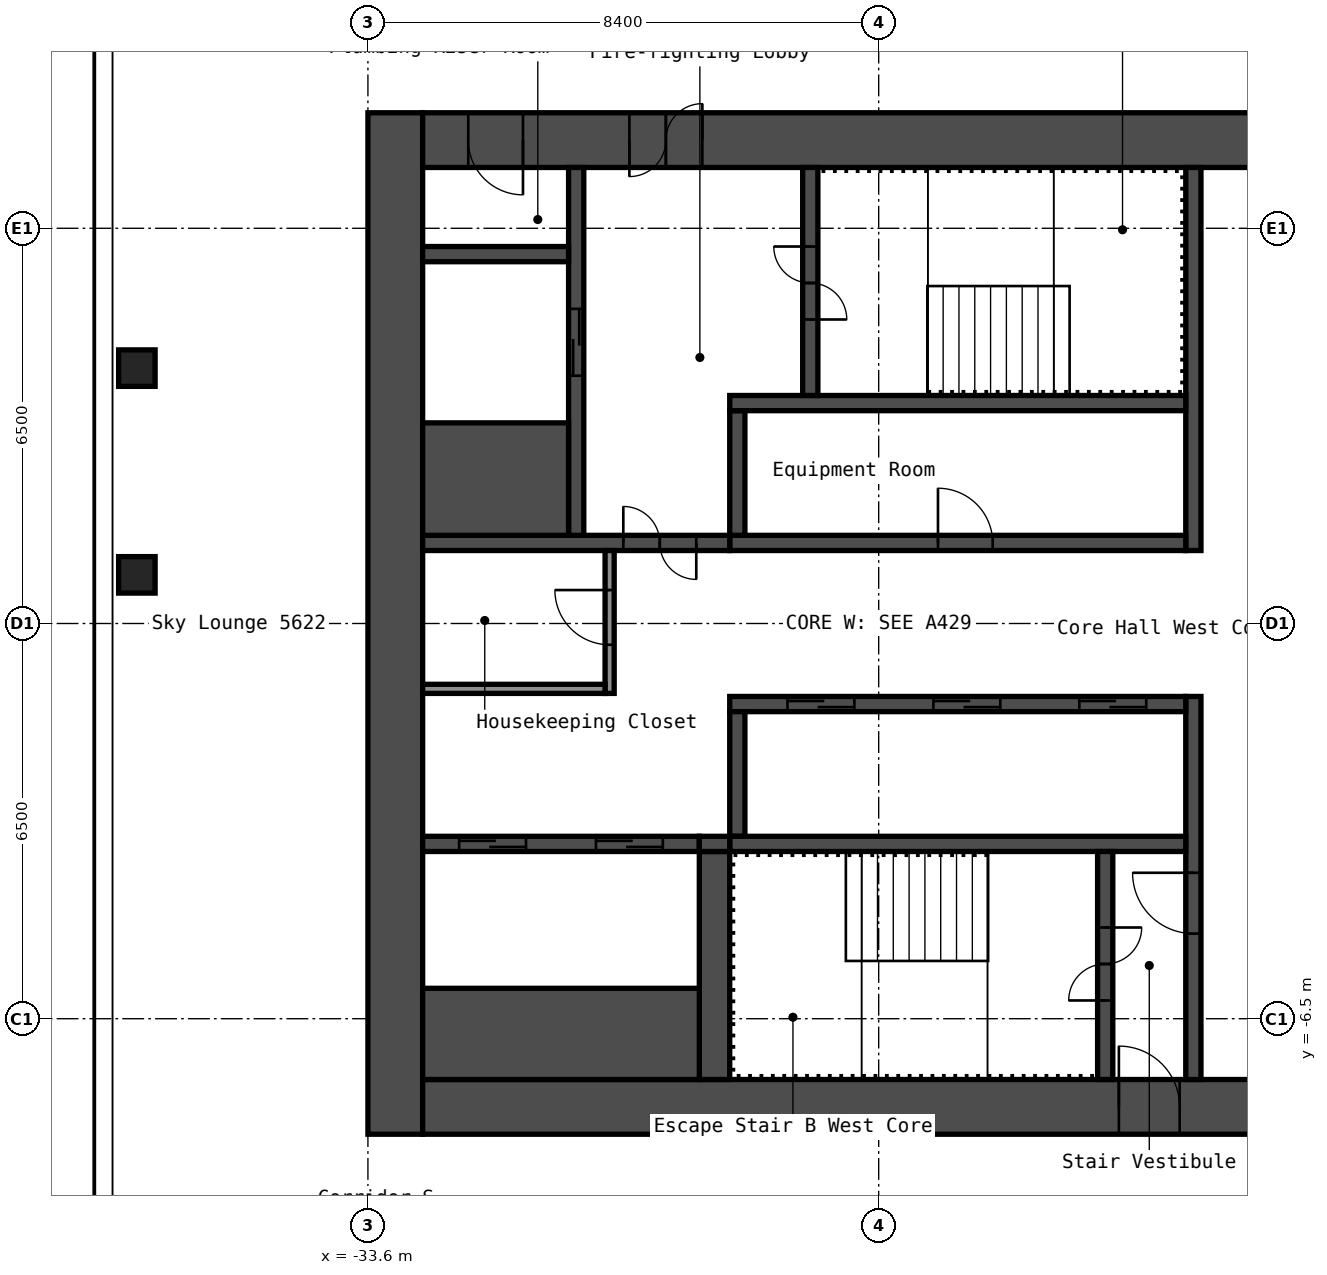
"""IFC4 building model, lengths in metres.
Left out: names, types, materials, properties, quantities, classifications, styles, units other than length and angle.
Written with IfcOpenShell. Run it as: python <this file> out.ifc"""

import sys

from ifc_helpers import new_model, si_unit, direction, frame, frame_2d, origin, origin_2d, place, context, subcontext, project, spatial, rectangle, hollow_rectangle, extrude, element, fill, save


model = new_model("IFC4")
c1 = context("Model", 3, precision=1e-05, world=origin(), true_north=direction((0.0, 1.0)))
c2 = subcontext(c1, "Body", "Model", "MODEL_VIEW")
j1 = project(units=[si_unit("LENGTHUNIT", "METRE"), si_unit("PLANEANGLEUNIT", "RADIAN")], contexts=[c1])
p1 = place(None, origin())
s1 = spatial("IfcSite", under=j1, at=p1, CompositionType="ELEMENT")
p2 = place(p1, origin())
s2 = spatial("IfcBuilding", under=s1, at=p2, CompositionType="ELEMENT")
p3 = place(p2, frame((0.0, 0.0, 199.4)))
s3 = spatial("IfcBuildingStorey", under=s2, at=p3, CompositionType="ELEMENT", Elevation=199.4)
for number, where, z_axis, x_axis in (
    (1, (-37.4, 0.8, 0.0), (0.0, 0.0, 1.0), (1.0, 0.0, 0.0)),
    (2, (-37.4, 4.2, 0.0), (0.0, 0.0, 1.0), (1.0, 0.0, 0.0)),
):
    element("IfcColumn", number, at=place(p3, frame(where, z_axis=z_axis, x_axis=x_axis)), inside=s3, PredefinedType="COLUMN", context=c2, shape_type="SweptSolid", body=[
        extrude(hollow_rectangle(XDim=0.6, YDim=0.6, WallThickness=0.025, InnerFilletRadius=0.038, OuterFilletRadius=0.062, at=origin_2d()), origin(), (0.0, 0.0, 1.0), 2.75),
    ])
p4 = place(p3, frame((-33.15, -8.4, 0.0), z_axis=(0.0, 0.0, 1.0), x_axis=(0.0, 1.0, 0.0)))
e3 = element("IfcWall", 3, at=p4, inside=s3, PredefinedType="SHEAR", context=c2, shape_type="SweptSolid", body=[
    extrude(rectangle(XDim=16.8, YDim=0.9, at=frame_2d((8.4, 0.0))), origin(), (0.0, 0.0, 1.0), 2.75),
])
p5 = place(p3, frame((-32.7, 7.95, 0.0), z_axis=(0.0, 0.0, 1.0), x_axis=(1.0, 0.0, 0.0)))
e4 = element("IfcWall", 4, at=p5, inside=s3, PredefinedType="SHEAR", context=c2, shape_type="SweptSolid", body=[
    extrude(rectangle(XDim=15.0, YDim=0.9, at=frame_2d((7.5, 0.0))), origin(), (0.0, 0.0, 1.0), 2.75),
])
p6 = place(p5, frame((3.4, 0.0, 0.0)))
e5 = element("IfcOpeningElement", 5, at=p6, cuts=e4, PredefinedType="OPENING", context=c2, shape_type="SweptSolid", body=[
    extrude(rectangle(XDim=1.2, YDim=2.1, at=frame_2d((0.6, 1.05))), frame((0.0, 0.46, 0.0), z_axis=(0.0, -1.0, 0.0), x_axis=(1.0, 0.0, 0.0)), (0.0, 0.0, 1.0), 0.92),
])
p7 = place(p5, frame((0.75, 0.0, 0.0)))
e6 = element("IfcOpeningElement", 6, at=p7, cuts=e4, PredefinedType="OPENING", context=c2, shape_type="SweptSolid", body=[
    extrude(rectangle(XDim=0.9, YDim=2.1, at=frame_2d((0.45, 1.05))), frame((0.0, 0.46, 0.0), z_axis=(0.0, -1.0, 0.0), x_axis=(1.0, 0.0, 0.0)), (0.0, 0.0, 1.0), 0.92),
])
p8 = place(p3, frame((-32.7, -7.95, 0.0), z_axis=(0.0, 0.0, 1.0), x_axis=(1.0, 0.0, 0.0)))
e7 = element("IfcWall", 7, at=p8, inside=s3, PredefinedType="SHEAR", context=c2, shape_type="SweptSolid", body=[
    extrude(rectangle(XDim=15.0, YDim=0.9, at=frame_2d((7.5, 0.0))), origin(), (0.0, 0.0, 1.0), 2.75),
])
p9 = place(p8, frame((11.45, 0.0, 0.0)))
e8 = element("IfcOpeningElement", 8, at=p9, cuts=e7, PredefinedType="OPENING", context=c2, shape_type="SweptSolid", body=[
    extrude(rectangle(XDim=1.0, YDim=2.1, at=frame_2d((0.5, 1.05))), frame((0.0, 0.46, 0.0), z_axis=(0.0, -1.0, 0.0), x_axis=(1.0, 0.0, 0.0)), (0.0, 0.0, 1.0), 0.92),
])
p10 = place(p3, frame((-20.025, 1.2, 0.0), z_axis=(0.0, 0.0, 1.0), x_axis=(0.0, 1.0, 0.0)))
e9 = element("IfcWall", 9, at=p10, inside=s3, PredefinedType="SHEAR", context=c2, shape_type="SweptSolid", body=[
    extrude(rectangle(XDim=6.3, YDim=0.25, at=frame_2d((3.15, 0.0))), origin(), (0.0, 0.0, 1.0), 2.75),
])
p11 = place(p3, frame((-20.025, -7.5, 0.0), z_axis=(0.0, 0.0, 1.0), x_axis=(0.0, 1.0, 0.0)))
e10 = element("IfcWall", 10, at=p11, inside=s3, PredefinedType="SHEAR", context=c2, shape_type="SweptSolid", body=[
    extrude(rectangle(XDim=6.3, YDim=0.25, at=frame_2d((3.15, 0.0))), origin(), (0.0, 0.0, 1.0), 2.75),
])
p12 = place(p11, frame((2.4, 0.0, 0.0)))
e11 = element("IfcOpeningElement", 11, at=p12, cuts=e10, PredefinedType="OPENING", context=c2, shape_type="SweptSolid", body=[
    extrude(rectangle(XDim=1.0, YDim=2.1, at=frame_2d((0.5, 1.05))), frame((0.0, 0.135, 0.0), z_axis=(0.0, -1.0, 0.0), x_axis=(1.0, 0.0, 0.0)), (0.0, 0.0, 1.0), 0.27),
])
p13 = place(p3, frame((-27.65, 1.325, 0.0), z_axis=(0.0, 0.0, 1.0), x_axis=(1.0, 0.0, 0.0)))
e12 = element("IfcWall", 12, at=p13, inside=s3, PredefinedType="SHEAR", context=c2, shape_type="SweptSolid", body=[
    extrude(rectangle(XDim=7.5, YDim=0.25, at=frame_2d((3.75, 0.0))), origin(), (0.0, 0.0, 1.0), 2.75),
])
p14 = place(p13, frame((3.425, 0.0, 0.0)))
e13 = element("IfcOpeningElement", 13, at=p14, cuts=e12, PredefinedType="OPENING", context=c2, shape_type="SweptSolid", body=[
    extrude(rectangle(XDim=0.9, YDim=2.1, at=frame_2d((0.45, 1.05))), frame((0.0, 0.135, 0.0), z_axis=(0.0, -1.0, 0.0), x_axis=(1.0, 0.0, 0.0)), (0.0, 0.0, 1.0), 0.27),
])
p15 = place(p3, frame((-27.525, 1.45, 0.0), z_axis=(0.0, 0.0, 1.0), x_axis=(0.0, 1.0, 0.0)))
e14 = element("IfcWall", 14, at=p15, inside=s3, PredefinedType="SHEAR", context=c2, shape_type="SweptSolid", body=[
    extrude(rectangle(XDim=2.05, YDim=0.25, at=frame_2d((1.025, 0.0))), origin(), (0.0, 0.0, 1.0), 2.75),
])
p16 = place(p3, frame((-27.65, 3.625, 0.0), z_axis=(0.0, 0.0, 1.0), x_axis=(1.0, 0.0, 0.0)))
e15 = element("IfcWall", 15, at=p16, inside=s3, PredefinedType="SHEAR", context=c2, shape_type="SweptSolid", body=[
    extrude(rectangle(XDim=7.5, YDim=0.25, at=frame_2d((3.75, 0.0))), origin(), (0.0, 0.0, 1.0), 2.75),
])
p17 = place(p3, frame((-26.325, 3.75, 0.0), z_axis=(0.0, 0.0, 1.0), x_axis=(0.0, 1.0, 0.0)))
e16 = element("IfcWall", 16, at=p17, inside=s3, PredefinedType="SHEAR", context=c2, shape_type="SweptSolid", body=[
    extrude(rectangle(XDim=3.75, YDim=0.25, at=frame_2d((1.875, 0.0))), origin(), (0.0, 0.0, 1.0), 2.75),
])
p18 = place(p17, frame((1.25, 0.0, 0.0)))
e17 = element("IfcOpeningElement", 17, at=p18, cuts=e16, PredefinedType="OPENING", context=c2, shape_type="SweptSolid", body=[
    extrude(rectangle(XDim=1.2, YDim=2.1, at=frame_2d((0.6, 1.05))), frame((0.0, 0.135, 0.0), z_axis=(0.0, -1.0, 0.0), x_axis=(1.0, 0.0, 0.0)), (0.0, 0.0, 1.0), 0.27),
])
p19 = place(p3, frame((-32.7, 1.325, 0.0), z_axis=(0.0, 0.0, 1.0), x_axis=(1.0, 0.0, 0.0)))
e18 = element("IfcWall", 18, at=p19, inside=s3, PredefinedType="SHEAR", context=c2, shape_type="SweptSolid", body=[
    extrude(rectangle(XDim=5.05, YDim=0.25, at=frame_2d((2.525, 0.0))), origin(), (0.0, 0.0, 1.0), 2.75),
])
p20 = place(p19, frame((3.3, 0.0, 0.0)))
e19 = element("IfcOpeningElement", 19, at=p20, cuts=e18, PredefinedType="OPENING", context=c2, shape_type="SweptSolid", body=[
    extrude(rectangle(XDim=1.2, YDim=2.1, at=frame_2d((0.6, 1.05))), frame((0.0, 0.135, 0.0), z_axis=(0.0, -1.0, 0.0), x_axis=(1.0, 0.0, 0.0)), (0.0, 0.0, 1.0), 0.27),
])
p21 = place(p3, frame((-30.175, 1.45, 0.0), z_axis=(0.0, 0.0, 1.0), x_axis=(0.0, 1.0, 0.0)))
e20 = element("IfcWall", 20, at=p21, inside=s3, PredefinedType="SHEAR", context=c2, shape_type="SweptSolid", body=[
    extrude(rectangle(XDim=6.05, YDim=0.25, at=frame_2d((3.025, 0.0))), origin(), (0.0, 0.0, 1.0), 2.75),
])
p22 = place(p21, frame((2.625, 0.0, 0.0)))
e21 = element("IfcOpeningElement", 21, at=p22, cuts=e20, PredefinedType="OPENING", context=c2, shape_type="SweptSolid", body=[
    extrude(rectangle(XDim=1.1, YDim=2.1, at=frame_2d((0.55, 1.05))), frame((0.0, 0.135, 0.0), z_axis=(0.0, -1.0, 0.0), x_axis=(1.0, 0.0, 0.0)), (0.0, 0.0, 1.0), 0.27),
])
p23 = place(p3, frame((-32.7, 2.375, 0.0), z_axis=(0.0, 0.0, 1.0), x_axis=(1.0, 0.0, 0.0)))
e22 = element("IfcWall", 22, at=p23, inside=s3, PredefinedType="SHEAR", context=c2, shape_type="SweptSolid", body=[
    extrude(rectangle(XDim=2.4, YDim=1.85, at=frame_2d((1.2, 0.0))), origin(), (0.0, 0.0, 1.0), 2.75),
])
p24 = place(p3, frame((-32.7, 6.075, 0.0), z_axis=(0.0, 0.0, 1.0), x_axis=(1.0, 0.0, 0.0)))
e23 = element("IfcWall", 23, at=p24, inside=s3, PredefinedType="SHEAR", context=c2, shape_type="SweptSolid", body=[
    extrude(rectangle(XDim=2.4, YDim=0.25, at=frame_2d((1.2, 0.0))), origin(), (0.0, 0.0, 1.0), 2.75),
])
p25 = place(p3, frame((-27.65, -1.325, 0.0), z_axis=(0.0, 0.0, 1.0), x_axis=(1.0, 0.0, 0.0)))
e24 = element("IfcWall", 24, at=p25, inside=s3, PredefinedType="SHEAR", context=c2, shape_type="SweptSolid", body=[
    extrude(rectangle(XDim=7.5, YDim=0.25, at=frame_2d((3.75, 0.0))), origin(), (0.0, 0.0, 1.0), 2.75),
])
p26 = place(p25, frame((5.75, 0.0, 0.0)))
e25 = element("IfcOpeningElement", 25, at=p26, cuts=e24, PredefinedType="OPENING", context=c2, shape_type="SweptSolid", body=[
    extrude(rectangle(XDim=1.1, YDim=2.1, at=frame_2d((0.55, 1.05))), frame((0.0, 0.135, 0.0), z_axis=(0.0, -1.0, 0.0), x_axis=(1.0, 0.0, 0.0)), (0.0, 0.0, 1.0), 0.27),
])
p27 = place(p25, frame((3.35, 0.0, 0.0)))
e26 = element("IfcOpeningElement", 26, at=p27, cuts=e24, PredefinedType="OPENING", context=c2, shape_type="SweptSolid", body=[
    extrude(rectangle(XDim=1.1, YDim=2.1, at=frame_2d((0.55, 1.05))), frame((0.0, 0.135, 0.0), z_axis=(0.0, -1.0, 0.0), x_axis=(1.0, 0.0, 0.0)), (0.0, 0.0, 1.0), 0.27),
])
p28 = place(p25, frame((0.95, 0.0, 0.0)))
e27 = element("IfcOpeningElement", 27, at=p28, cuts=e24, PredefinedType="OPENING", context=c2, shape_type="SweptSolid", body=[
    extrude(rectangle(XDim=1.1, YDim=2.1, at=frame_2d((0.55, 1.05))), frame((0.0, 0.135, 0.0), z_axis=(0.0, -1.0, 0.0), x_axis=(1.0, 0.0, 0.0)), (0.0, 0.0, 1.0), 0.27),
])
p29 = place(p3, frame((-27.525, -3.5, 0.0), z_axis=(0.0, 0.0, 1.0), x_axis=(0.0, 1.0, 0.0)))
e28 = element("IfcWall", 28, at=p29, inside=s3, PredefinedType="SHEAR", context=c2, shape_type="SweptSolid", body=[
    extrude(rectangle(XDim=2.05, YDim=0.25, at=frame_2d((1.025, 0.0))), origin(), (0.0, 0.0, 1.0), 2.75),
])
p30 = place(p3, frame((-27.65, -3.625, 0.0), z_axis=(0.0, 0.0, 1.0), x_axis=(1.0, 0.0, 0.0)))
e29 = element("IfcWall", 29, at=p30, inside=s3, PredefinedType="SHEAR", context=c2, shape_type="SweptSolid", body=[
    extrude(rectangle(XDim=7.5, YDim=0.25, at=frame_2d((3.75, 0.0))), origin(), (0.0, 0.0, 1.0), 2.75),
])
p31 = place(p3, frame((-21.475, -7.5, 0.0), z_axis=(0.0, 0.0, 1.0), x_axis=(0.0, 1.0, 0.0)))
e30 = element("IfcWall", 30, at=p31, inside=s3, PredefinedType="SHEAR", context=c2, shape_type="SweptSolid", body=[
    extrude(rectangle(XDim=3.75, YDim=0.25, at=frame_2d((1.875, 0.0))), origin(), (0.0, 0.0, 1.0), 2.75),
])
p32 = place(p31, frame((1.3, 0.0, 0.0)))
e31 = element("IfcOpeningElement", 31, at=p32, cuts=e30, PredefinedType="OPENING", context=c2, shape_type="SweptSolid", body=[
    extrude(rectangle(XDim=1.2, YDim=2.1, at=frame_2d((0.6, 1.05))), frame((0.0, 0.135, 0.0), z_axis=(0.0, -1.0, 0.0), x_axis=(1.0, 0.0, 0.0)), (0.0, 0.0, 1.0), 0.27),
])
p33 = place(p3, frame((-27.9, -7.5, 0.0), z_axis=(0.0, 0.0, 1.0), x_axis=(0.0, 1.0, 0.0)))
e32 = element("IfcWall", 32, at=p33, inside=s3, PredefinedType="SHEAR", context=c2, shape_type="SweptSolid", body=[
    extrude(rectangle(XDim=3.75, YDim=0.5, at=frame_2d((1.875, 0.0))), origin(), (0.0, 0.0, 1.0), 2.75),
])
p34 = place(p3, frame((-32.7, -3.625, 0.0), z_axis=(0.0, 0.0, 1.0), x_axis=(1.0, 0.0, 0.0)))
e33 = element("IfcWall", 33, at=p34, inside=s3, PredefinedType="SHEAR", context=c2, shape_type="SweptSolid", body=[
    extrude(rectangle(XDim=4.55, YDim=0.25, at=frame_2d((2.275, 0.0))), origin(), (0.0, 0.0, 1.0), 2.75),
])
p35 = place(p34, frame((2.85, 0.0, 0.0)))
e34 = element("IfcOpeningElement", 34, at=p35, cuts=e33, PredefinedType="OPENING", context=c2, shape_type="SweptSolid", body=[
    extrude(rectangle(XDim=1.1, YDim=2.1, at=frame_2d((0.55, 1.05))), frame((0.0, 0.135, 0.0), z_axis=(0.0, -1.0, 0.0), x_axis=(1.0, 0.0, 0.0)), (0.0, 0.0, 1.0), 0.27),
])
p36 = place(p34, frame((0.6, 0.0, 0.0)))
e35 = element("IfcOpeningElement", 35, at=p36, cuts=e33, PredefinedType="OPENING", context=c2, shape_type="SweptSolid", body=[
    extrude(rectangle(XDim=1.1, YDim=2.1, at=frame_2d((0.55, 1.05))), frame((0.0, 0.135, 0.0), z_axis=(0.0, -1.0, 0.0), x_axis=(1.0, 0.0, 0.0)), (0.0, 0.0, 1.0), 0.27),
])
p37 = place(p3, frame((-32.7, -6.75, 0.0), z_axis=(0.0, 0.0, 1.0), x_axis=(1.0, 0.0, 0.0)))
e36 = element("IfcWall", 36, at=p37, inside=s3, PredefinedType="SHEAR", context=c2, shape_type="SweptSolid", body=[
    extrude(rectangle(XDim=4.55, YDim=1.5, at=frame_2d((2.275, 0.0))), origin(), (0.0, 0.0, 1.0), 2.75),
])
p38 = place(p3, frame((-28.15, -3.625, 0.0), z_axis=(0.0, 0.0, 1.0), x_axis=(1.0, 0.0, 0.0)))
e37 = element("IfcWall", 37, at=p38, inside=s3, PredefinedType="SHEAR", context=c2, shape_type="SweptSolid", body=[
    extrude(rectangle(XDim=0.5, YDim=0.25, at=frame_2d((0.25, 0.0))), origin(), (0.0, 0.0, 1.0), 2.75),
])
p39 = place(p3, frame((-29.625, -1.15, 0.0), z_axis=(0.0, 0.0, 1.0), x_axis=(0.0, 1.0, 0.0)))
e38 = element("IfcWall", 38, at=p39, inside=s3, PredefinedType="PARTITIONING", context=c2, shape_type="SweptSolid", body=[
    extrude(rectangle(XDim=2.35, YDim=0.15, at=frame_2d((1.175, 0.0))), origin(), (0.0, 0.0, 1.0), 2.75),
])
p40 = place(p39, frame((0.8, 0.0, 0.0)))
e39 = element("IfcOpeningElement", 39, at=p40, cuts=e38, PredefinedType="OPENING", context=c2, shape_type="SweptSolid", body=[
    extrude(rectangle(XDim=0.9, YDim=2.1, at=frame_2d((0.45, 1.05))), frame((0.0, 0.085, 0.0), z_axis=(0.0, -1.0, 0.0), x_axis=(1.0, 0.0, 0.0)), (0.0, 0.0, 1.0), 0.17),
])
p41 = place(p3, frame((-32.7, -1.075, 0.0), z_axis=(0.0, 0.0, 1.0), x_axis=(1.0, 0.0, 0.0)))
e40 = element("IfcWall", 40, at=p41, inside=s3, PredefinedType="PARTITIONING", context=c2, shape_type="SweptSolid", body=[
    extrude(rectangle(XDim=3.0, YDim=0.15, at=frame_2d((1.5, 0.0))), origin(), (0.0, 0.0, 1.0), 2.75),
])
p42 = place(p6, origin())
e41 = element("IfcDoor", 41, at=p42, inside=s3, OperationType="DOUBLE_DOOR_SINGLE_SWING", PredefinedType="DOOR", context=c2, shape_type="SweptSolid", body=[
    extrude(rectangle(XDim=1.2, YDim=2.1, at=frame_2d((0.6, 1.05))), frame((0.0, 0.025, 0.0), z_axis=(0.0, -1.0, 0.0), x_axis=(1.0, 0.0, 0.0)), (0.0, 0.0, 1.0), 0.05),
])
fill(e5, e41)
p43 = place(p7, origin())
e42 = element("IfcDoor", 42, at=p43, inside=s3, OperationType="SINGLE_SWING_RIGHT", PredefinedType="DOOR", context=c2, shape_type="SweptSolid", body=[
    extrude(rectangle(XDim=0.9, YDim=2.1, at=frame_2d((0.45, 1.05))), frame((0.0, 0.025, 0.0), z_axis=(0.0, -1.0, 0.0), x_axis=(1.0, 0.0, 0.0)), (0.0, 0.0, 1.0), 0.05),
])
fill(e6, e42)
p44 = place(p9, origin())
e43 = element("IfcDoor", 43, at=p44, inside=s3, OperationType="SINGLE_SWING_RIGHT", PredefinedType="DOOR", context=c2, shape_type="SweptSolid", body=[
    extrude(rectangle(XDim=1.0, YDim=2.1, at=frame_2d((0.5, 1.05))), frame((0.0, 0.025, 0.0), z_axis=(0.0, -1.0, 0.0), x_axis=(1.0, 0.0, 0.0)), (0.0, 0.0, 1.0), 0.05),
])
fill(e8, e43)
p45 = place(p18, origin())
e44 = element("IfcDoor", 44, at=p45, inside=s3, OperationType="DOUBLE_DOOR_SINGLE_SWING", PredefinedType="DOOR", context=c2, shape_type="SweptSolid", body=[
    extrude(rectangle(XDim=1.2, YDim=2.1, at=frame_2d((0.6, 1.05))), frame((0.0, 0.025, 0.0), z_axis=(0.0, -1.0, 0.0), x_axis=(1.0, 0.0, 0.0)), (0.0, 0.0, 1.0), 0.05),
])
fill(e17, e44)
p46 = place(p32, origin())
e45 = element("IfcDoor", 45, at=p46, inside=s3, OperationType="DOUBLE_DOOR_SINGLE_SWING", PredefinedType="DOOR", context=c2, shape_type="SweptSolid", body=[
    extrude(rectangle(XDim=1.2, YDim=2.1, at=frame_2d((0.6, 1.05))), frame((0.0, 0.025, 0.0), z_axis=(0.0, -1.0, 0.0), x_axis=(1.0, 0.0, 0.0)), (0.0, 0.0, 1.0), 0.05),
])
fill(e31, e45)
p47 = place(p12, origin())
e46 = element("IfcDoor", 46, at=p47, inside=s3, OperationType="SINGLE_SWING_LEFT", PredefinedType="DOOR", context=c2, shape_type="SweptSolid", body=[
    extrude(rectangle(XDim=1.0, YDim=2.1, at=frame_2d((0.5, 1.05))), frame((0.0, 0.025, 0.0), z_axis=(0.0, -1.0, 0.0), x_axis=(1.0, 0.0, 0.0)), (0.0, 0.0, 1.0), 0.05),
])
fill(e11, e46)
p48 = place(p20, origin())
e47 = element("IfcDoor", 47, at=p48, inside=s3, OperationType="DOUBLE_DOOR_SINGLE_SWING", PredefinedType="DOOR", context=c2, shape_type="SweptSolid", body=[
    extrude(rectangle(XDim=1.2, YDim=2.1, at=frame_2d((0.6, 1.05))), frame((0.0, 0.025, 0.0), z_axis=(0.0, -1.0, 0.0), x_axis=(1.0, 0.0, 0.0)), (0.0, 0.0, 1.0), 0.05),
])
fill(e19, e47)
p49 = place(p40, origin())
e48 = element("IfcDoor", 48, at=p49, inside=s3, OperationType="SINGLE_SWING_LEFT", PredefinedType="DOOR", context=c2, shape_type="SweptSolid", body=[
    extrude(rectangle(XDim=0.9, YDim=2.1, at=frame_2d((0.45, 1.05))), frame((0.0, 0.025, 0.0), z_axis=(0.0, -1.0, 0.0), x_axis=(1.0, 0.0, 0.0)), (0.0, 0.0, 1.0), 0.05),
])
fill(e39, e48)
p50 = place(p14, origin())
e49 = element("IfcDoor", 49, at=p50, inside=s3, OperationType="SINGLE_SWING_RIGHT", PredefinedType="DOOR", context=c2, shape_type="SweptSolid", body=[
    extrude(rectangle(XDim=0.9, YDim=2.1, at=frame_2d((0.45, 1.05))), frame((0.0, 0.025, 0.0), z_axis=(0.0, -1.0, 0.0), x_axis=(1.0, 0.0, 0.0)), (0.0, 0.0, 1.0), 0.05),
])
fill(e13, e49)
p51 = place(p26, origin())
e50 = element("IfcDoor", 50, at=p51, inside=s3, OperationType="DOUBLE_DOOR_SLIDING", PredefinedType="DOOR", context=c2, shape_type="SweptSolid", body=[
    extrude(rectangle(XDim=1.1, YDim=2.1, at=frame_2d((0.55, 1.05))), frame((0.0, 0.025, 0.0), z_axis=(0.0, -1.0, 0.0), x_axis=(1.0, 0.0, 0.0)), (0.0, 0.0, 1.0), 0.05),
])
fill(e25, e50)
p52 = place(p27, origin())
e51 = element("IfcDoor", 51, at=p52, inside=s3, OperationType="DOUBLE_DOOR_SLIDING", PredefinedType="DOOR", context=c2, shape_type="SweptSolid", body=[
    extrude(rectangle(XDim=1.1, YDim=2.1, at=frame_2d((0.55, 1.05))), frame((0.0, 0.025, 0.0), z_axis=(0.0, -1.0, 0.0), x_axis=(1.0, 0.0, 0.0)), (0.0, 0.0, 1.0), 0.05),
])
fill(e26, e51)
p53 = place(p28, origin())
e52 = element("IfcDoor", 52, at=p53, inside=s3, OperationType="DOUBLE_DOOR_SLIDING", PredefinedType="DOOR", context=c2, shape_type="SweptSolid", body=[
    extrude(rectangle(XDim=1.1, YDim=2.1, at=frame_2d((0.55, 1.05))), frame((0.0, 0.025, 0.0), z_axis=(0.0, -1.0, 0.0), x_axis=(1.0, 0.0, 0.0)), (0.0, 0.0, 1.0), 0.05),
])
fill(e27, e52)
p54 = place(p22, origin())
e53 = element("IfcDoor", 53, at=p54, inside=s3, OperationType="DOUBLE_DOOR_SLIDING", PredefinedType="DOOR", context=c2, shape_type="SweptSolid", body=[
    extrude(rectangle(XDim=1.1, YDim=2.1, at=frame_2d((0.55, 1.05))), frame((0.0, 0.025, 0.0), z_axis=(0.0, -1.0, 0.0), x_axis=(1.0, 0.0, 0.0)), (0.0, 0.0, 1.0), 0.05),
])
fill(e21, e53)
p55 = place(p35, origin())
e54 = element("IfcDoor", 54, at=p55, inside=s3, OperationType="DOUBLE_DOOR_SLIDING", PredefinedType="DOOR", context=c2, shape_type="SweptSolid", body=[
    extrude(rectangle(XDim=1.1, YDim=2.1, at=frame_2d((0.55, 1.05))), frame((0.0, 0.025, 0.0), z_axis=(0.0, -1.0, 0.0), x_axis=(1.0, 0.0, 0.0)), (0.0, 0.0, 1.0), 0.05),
])
fill(e34, e54)
p56 = place(p36, origin())
e55 = element("IfcDoor", 55, at=p56, inside=s3, OperationType="DOUBLE_DOOR_SLIDING", PredefinedType="DOOR", context=c2, shape_type="SweptSolid", body=[
    extrude(rectangle(XDim=1.1, YDim=2.1, at=frame_2d((0.55, 1.05))), frame((0.0, 0.025, 0.0), z_axis=(0.0, -1.0, 0.0), x_axis=(1.0, 0.0, 0.0)), (0.0, 0.0, 1.0), 0.05),
])
fill(e35, e55)
save(model, sys.argv[1])
